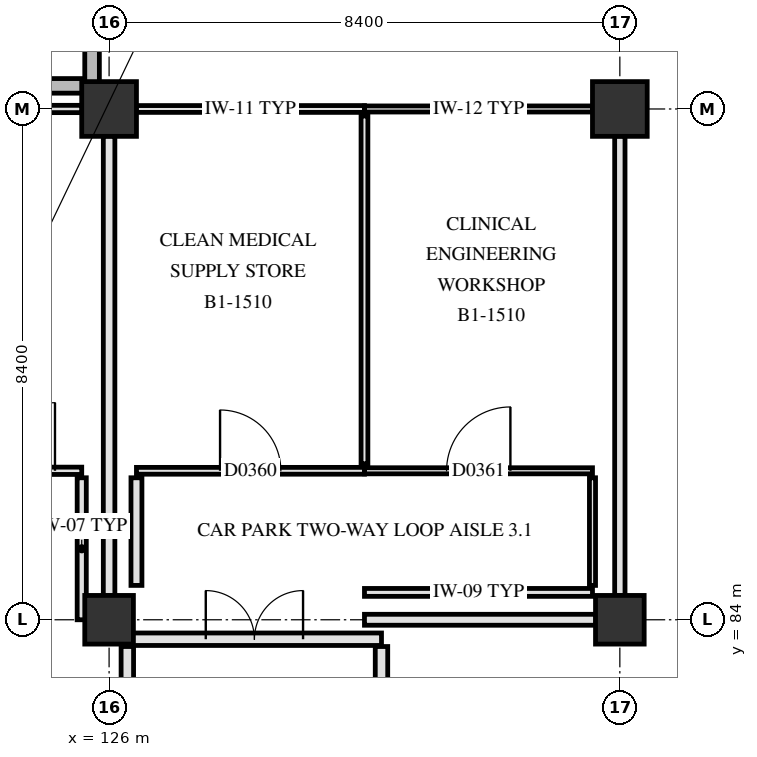
"""IFC4 building model, lengths in metres.
Left out: names, types, materials, properties, quantities, classifications, styles, units other than length and angle.
Written with IfcOpenShell. Run it as: python <this file> out.ifc"""

import sys

from ifc_helpers import new_model, si_unit, direction, frame, frame_2d, origin, origin_2d, place, context, subcontext, project, spatial, rectangle, extrude, element, fill, save


model = new_model("IFC4")
c1 = context("Model", 3, precision=1e-05, world=origin(), true_north=direction((0.0, 1.0)))
c2 = subcontext(c1, "Body", "Model", "MODEL_VIEW")
j1 = project(units=[si_unit("LENGTHUNIT", "METRE"), si_unit("PLANEANGLEUNIT", "RADIAN")], contexts=[c1])
p1 = place(None, origin())
s1 = spatial("IfcSite", under=j1, at=p1, CompositionType="ELEMENT")
p2 = place(p1, origin())
s2 = spatial("IfcBuilding", under=s1, at=p2, CompositionType="ELEMENT")
p3 = place(p2, frame((0.0, 0.0, -5.4)))
s3 = spatial("IfcBuildingStorey", under=s2, at=p3, CompositionType="ELEMENT", Elevation=-5.4)
p4 = place(p3, frame((126.0, 84.0, 0.0), z_axis=(0.0, 0.0, 1.0), x_axis=(1.0, 0.0, 0.0)))
e1 = element("IfcColumn", 1, at=p4, inside=s3, PredefinedType="COLUMN", context=c2, shape_type="SweptSolid", body=[
    extrude(rectangle(XDim=0.8, YDim=0.8, at=origin_2d()), origin(), (0.0, 0.0, 1.0), 5.4),
])
p5 = place(p3, frame((126.0, 92.4, 0.0), z_axis=(0.0, 0.0, 1.0), x_axis=(1.0, 0.0, 0.0)))
e2 = element("IfcColumn", 2, at=p5, inside=s3, PredefinedType="COLUMN", context=c2, shape_type="SweptSolid", body=[
    extrude(rectangle(XDim=0.9, YDim=0.9, at=origin_2d()), origin(), (0.0, 0.0, 1.0), 5.4),
])
p6 = place(p3, frame((134.4, 84.0, 0.0), z_axis=(0.0, 0.0, 1.0), x_axis=(1.0, 0.0, 0.0)))
e3 = element("IfcColumn", 3, at=p6, inside=s3, PredefinedType="COLUMN", context=c2, shape_type="SweptSolid", body=[
    extrude(rectangle(XDim=0.8, YDim=0.8, at=origin_2d()), origin(), (0.0, 0.0, 1.0), 5.4),
])
p7 = place(p3, frame((134.4, 92.4, 0.0), z_axis=(0.0, 0.0, 1.0), x_axis=(1.0, 0.0, 0.0)))
e4 = element("IfcColumn", 4, at=p7, inside=s3, PredefinedType="COLUMN", context=c2, shape_type="SweptSolid", body=[
    extrude(rectangle(XDim=0.9, YDim=0.9, at=origin_2d()), origin(), (0.0, 0.0, 1.0), 5.4),
])
p8 = place(p3, frame((117.9, 92.78, 0.0), z_axis=(0.0, 0.0, 1.0), x_axis=(1.0, 0.0, 0.0)))
e5 = element("IfcWall", 5, at=p8, inside=s3, PredefinedType="SHEAR", context=c2, shape_type="SweptSolid", body=[
    extrude(rectangle(XDim=7.82, YDim=0.24, at=frame_2d((3.91, 0.0))), origin(), (0.0, 0.0, 1.0), 5.08),
])
p9 = place(p3, frame((125.72, 92.78, 0.0), z_axis=(0.0, 0.0, 1.0), x_axis=(0.0, 1.0, 0.0)))
e6 = element("IfcWall", 6, at=p9, inside=s3, PredefinedType="SHEAR", context=c2, shape_type="SweptSolid", body=[
    extrude(rectangle(XDim=3.32, YDim=0.24, at=frame_2d((1.66, 0.0))), origin(), (0.0, 0.0, 1.0), 5.08),
])
p10 = place(p3, frame((130.48, 79.44, 0.0), z_axis=(0.0, 0.0, 1.0), x_axis=(0.0, 1.0, 0.0)))
e7 = element("IfcWall", 7, at=p10, inside=s3, PredefinedType="PARTITIONING", context=c2, shape_type="SweptSolid", body=[
    extrude(rectangle(XDim=4.12, YDim=0.205, at=frame_2d((2.06, 0.0))), origin(), (0.0, 0.0, 1.0), 5.07),
])
p11 = place(p3, frame((126.3, 79.44, 0.0), z_axis=(0.0, 0.0, 1.0), x_axis=(0.0, 1.0, 0.0)))
e8 = element("IfcWall", 8, at=p11, inside=s3, PredefinedType="PARTITIONING", context=c2, shape_type="SweptSolid", body=[
    extrude(rectangle(XDim=4.12, YDim=0.205, at=frame_2d((2.06, 0.0))), origin(), (0.0, 0.0, 1.0), 4.47),
])
p12 = place(p3, frame((126.3, 83.68, 0.0), z_axis=(0.0, 0.0, 1.0), x_axis=(1.0, 0.0, 0.0)))
e9 = element("IfcWall", 9, at=p12, inside=s3, PredefinedType="PARTITIONING", context=c2, shape_type="SweptSolid", body=[
    extrude(rectangle(XDim=4.18, YDim=0.205, at=frame_2d((2.09, 0.0))), origin(), (0.0, 0.0, 1.0), 4.42),
])
p13 = place(p12, frame((1.29, 0.0, 0.0)))
e10 = element("IfcOpeningElement", 10, at=p13, cuts=e9, PredefinedType="OPENING", context=c2, shape_type="SweptSolid", body=[
    extrude(rectangle(XDim=1.6, YDim=2.25, at=frame_2d((0.8, 1.125))), frame((0.0, 0.113, 0.0), z_axis=(0.0, -1.0, 0.0), x_axis=(1.0, 0.0, 0.0)), (0.0, 0.0, 1.0), 0.225),
])
p14 = place(p3, frame((130.2, 84.0, 0.0), z_axis=(0.0, 0.0, 1.0), x_axis=(1.0, 0.0, 0.0)))
e11 = element("IfcWall", 11, at=p14, inside=s3, PredefinedType="PARTITIONING", context=c2, shape_type="SweptSolid", body=[
    extrude(rectangle(XDim=3.805, YDim=0.18, at=frame_2d((1.902, 0.0))), origin(), (0.0, 0.0, 1.0), 4.42),
])
p15 = place(p3, frame((130.2, 84.45, 0.0), z_axis=(0.0, 0.0, 1.0), x_axis=(1.0, 0.0, 0.0)))
e12 = element("IfcWall", 12, at=p15, inside=s3, PredefinedType="PARTITIONING", context=c2, shape_type="SweptSolid", body=[
    extrude(rectangle(XDim=3.75, YDim=0.13, at=frame_2d((1.875, 0.0))), origin(), (0.0, 0.0, 1.0), 5.07),
])
p16 = place(p3, frame((123.55, 86.45, 0.0), z_axis=(0.0, 0.0, 1.0), x_axis=(1.0, 0.0, 0.0)))
e13 = element("IfcWall", 13, at=p16, inside=s3, PredefinedType="PARTITIONING", context=c2, shape_type="SweptSolid", body=[
    extrude(rectangle(XDim=2.0, YDim=0.12, at=frame_2d((1.0, 0.0))), origin(), (0.0, 0.0, 1.0), 5.07),
])
p17 = place(p16, frame((0.44, 0.0, 0.0)))
e14 = element("IfcOpeningElement", 14, at=p17, cuts=e13, PredefinedType="OPENING", context=c2, shape_type="SweptSolid", body=[
    extrude(rectangle(XDim=1.12, YDim=2.18, at=frame_2d((0.56, 1.09))), frame((0.0, 0.07, 0.0), z_axis=(0.0, -1.0, 0.0), x_axis=(1.0, 0.0, 0.0)), (0.0, 0.0, 1.0), 0.14),
])
p18 = place(p3, frame((126.45, 86.45, 0.0), z_axis=(0.0, 0.0, 1.0), x_axis=(1.0, 0.0, 0.0)))
e15 = element("IfcWall", 15, at=p18, inside=s3, PredefinedType="PARTITIONING", context=c2, shape_type="SweptSolid", body=[
    extrude(rectangle(XDim=3.75, YDim=0.112, at=frame_2d((1.875, 0.0))), origin(), (0.0, 0.0, 1.0), 5.07),
])
p19 = place(p18, frame((1.375, 0.0, 0.0)))
e16 = element("IfcOpeningElement", 16, at=p19, cuts=e15, PredefinedType="OPENING", context=c2, shape_type="SweptSolid", body=[
    extrude(rectangle(XDim=1.0, YDim=2.15, at=frame_2d((0.5, 1.075))), frame((0.0, 0.066, 0.0), z_axis=(0.0, -1.0, 0.0), x_axis=(1.0, 0.0, 0.0)), (0.0, 0.0, 1.0), 0.132),
])
p20 = place(p3, frame((130.2, 86.45, 0.0), z_axis=(0.0, 0.0, 1.0), x_axis=(1.0, 0.0, 0.0)))
e17 = element("IfcWall", 17, at=p20, inside=s3, PredefinedType="PARTITIONING", context=c2, shape_type="SweptSolid", body=[
    extrude(rectangle(XDim=3.75, YDim=0.1, at=frame_2d((1.875, 0.0))), origin(), (0.0, 0.0, 1.0), 5.07),
])
p21 = place(p20, frame((1.35, 0.0, 0.0)))
e18 = element("IfcOpeningElement", 18, at=p21, cuts=e17, PredefinedType="OPENING", context=c2, shape_type="SweptSolid", body=[
    extrude(rectangle(XDim=1.05, YDim=2.15, at=frame_2d((0.525, 1.075))), frame((0.0, 0.06, 0.0), z_axis=(0.0, -1.0, 0.0), x_axis=(1.0, 0.0, 0.0)), (0.0, 0.0, 1.0), 0.12),
])
p22 = place(p3, frame((121.8, 92.4, 0.0), z_axis=(0.0, 0.0, 1.0), x_axis=(1.0, 0.0, 0.0)))
e19 = element("IfcWall", 19, at=p22, inside=s3, PredefinedType="PARTITIONING", context=c2, shape_type="SweptSolid", body=[
    extrude(rectangle(XDim=3.755, YDim=0.12, at=frame_2d((1.877, 0.0))), origin(), (0.0, 0.0, 1.0), 4.42),
])
p23 = place(p3, frame((126.445, 92.4, 0.0), z_axis=(0.0, 0.0, 1.0), x_axis=(1.0, 0.0, 0.0)))
e20 = element("IfcWall", 20, at=p23, inside=s3, PredefinedType="PARTITIONING", context=c2, shape_type="SweptSolid", body=[
    extrude(rectangle(XDim=3.755, YDim=0.112, at=frame_2d((1.877, 0.0))), origin(), (0.0, 0.0, 1.0), 4.42),
])
p24 = place(p3, frame((130.2, 92.4, 0.0), z_axis=(0.0, 0.0, 1.0), x_axis=(1.0, 0.0, 0.0)))
e21 = element("IfcWall", 21, at=p24, inside=s3, PredefinedType="PARTITIONING", context=c2, shape_type="SweptSolid", body=[
    extrude(rectangle(XDim=3.755, YDim=0.1, at=frame_2d((1.877, 0.0))), origin(), (0.0, 0.0, 1.0), 4.42),
])
p25 = place(p3, frame((125.55, 84.0, 0.0), z_axis=(0.0, 0.0, 1.0), x_axis=(0.0, 1.0, 0.0)))
e22 = element("IfcWall", 22, at=p25, inside=s3, PredefinedType="PARTITIONING", context=c2, shape_type="SweptSolid", body=[
    extrude(rectangle(XDim=2.335, YDim=0.15, at=frame_2d((1.167, 0.0))), origin(), (0.0, 0.0, 1.0), 4.42),
])
p26 = place(p3, frame((126.0, 84.395, 0.0), z_axis=(0.0, 0.0, 1.0), x_axis=(0.0, 1.0, 0.0)))
e23 = element("IfcWall", 23, at=p26, inside=s3, PredefinedType="PARTITIONING", context=c2, shape_type="SweptSolid", body=[
    extrude(rectangle(XDim=7.56, YDim=0.19, at=frame_2d((3.78, 0.0))), origin(), (0.0, 0.0, 1.0), 4.47),
])
p27 = place(p3, frame((126.45, 84.565, 0.0), z_axis=(0.0, 0.0, 1.0), x_axis=(0.0, 1.0, 0.0)))
e24 = element("IfcWall", 24, at=p27, inside=s3, PredefinedType="PARTITIONING", context=c2, shape_type="SweptSolid", body=[
    extrude(rectangle(XDim=1.77, YDim=0.18, at=frame_2d((0.885, 0.0))), origin(), (0.0, 0.0, 1.0), 5.07),
])
p28 = place(p3, frame((130.2, 86.565, 0.0), z_axis=(0.0, 0.0, 1.0), x_axis=(0.0, 1.0, 0.0)))
e25 = element("IfcWall", 25, at=p28, inside=s3, PredefinedType="PARTITIONING", context=c2, shape_type="SweptSolid", body=[
    extrude(rectangle(XDim=5.72, YDim=0.112, at=frame_2d((2.86, 0.0))), origin(), (0.0, 0.0, 1.0), 4.42),
])
p29 = place(p3, frame((133.95, 84.565, 0.0), z_axis=(0.0, 0.0, 1.0), x_axis=(0.0, 1.0, 0.0)))
e26 = element("IfcWall", 26, at=p29, inside=s3, PredefinedType="PARTITIONING", context=c2, shape_type="SweptSolid", body=[
    extrude(rectangle(XDim=1.77, YDim=0.1, at=frame_2d((0.885, 0.0))), origin(), (0.0, 0.0, 1.0), 5.07),
])
p30 = place(p3, frame((134.4, 84.395, 0.0), z_axis=(0.0, 0.0, 1.0), x_axis=(0.0, 1.0, 0.0)))
e27 = element("IfcWall", 27, at=p30, inside=s3, PredefinedType="PARTITIONING", context=c2, shape_type="SweptSolid", body=[
    extrude(rectangle(XDim=7.56, YDim=0.17, at=frame_2d((3.78, 0.0))), origin(), (0.0, 0.0, 1.0), 4.47),
])
p31 = place(p13, origin())
e28 = element("IfcDoor", 28, at=p31, inside=s3, OperationType="DOUBLE_SWING_LEFT", PredefinedType="DOOR", context=c2, shape_type="SweptSolid", body=[
    extrude(rectangle(XDim=1.6, YDim=2.25, at=frame_2d((0.8, 1.125))), frame((0.0, 0.025, 0.0), z_axis=(0.0, -1.0, 0.0), x_axis=(1.0, 0.0, 0.0)), (0.0, 0.0, 1.0), 0.05),
])
fill(e10, e28)
p32 = place(p17, origin())
e29 = element("IfcDoor", 29, at=p32, inside=s3, OperationType="SINGLE_SWING_RIGHT", PredefinedType="DOOR", context=c2, shape_type="SweptSolid", body=[
    extrude(rectangle(XDim=1.12, YDim=2.18, at=frame_2d((0.56, 1.09))), frame((0.0, 0.025, 0.0), z_axis=(0.0, -1.0, 0.0), x_axis=(1.0, 0.0, 0.0)), (0.0, 0.0, 1.0), 0.05),
])
fill(e14, e29)
p33 = place(p19, origin())
e30 = element("IfcDoor", 30, at=p33, inside=s3, OperationType="SINGLE_SWING_LEFT", PredefinedType="DOOR", context=c2, shape_type="SweptSolid", body=[
    extrude(rectangle(XDim=1.0, YDim=2.15, at=frame_2d((0.5, 1.075))), frame((0.0, 0.025, 0.0), z_axis=(0.0, -1.0, 0.0), x_axis=(1.0, 0.0, 0.0)), (0.0, 0.0, 1.0), 0.05),
])
fill(e16, e30)
p34 = place(p21, origin())
e31 = element("IfcDoor", 31, at=p34, inside=s3, OperationType="SINGLE_SWING_RIGHT", PredefinedType="DOOR", context=c2, shape_type="SweptSolid", body=[
    extrude(rectangle(XDim=1.05, YDim=2.15, at=frame_2d((0.525, 1.075))), frame((0.0, 0.025, 0.0), z_axis=(0.0, -1.0, 0.0), x_axis=(1.0, 0.0, 0.0)), (0.0, 0.0, 1.0), 0.05),
])
fill(e18, e31)
save(model, sys.argv[1])
